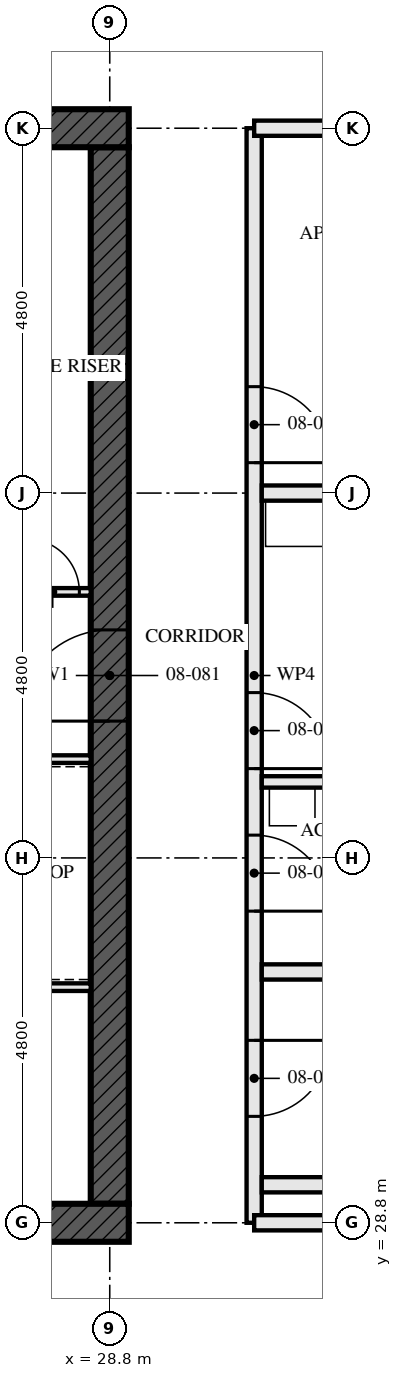
"""IFC4 building model, lengths in metres.
Left out: names, types, materials, properties, quantities, classifications, styles, units other than length and angle.
Written with IfcOpenShell. Run it as: python <this file> out.ifc"""

import sys

from ifc_helpers import new_model, si_unit, direction, frame, frame_2d, origin, place, context, subcontext, project, spatial, rectangle, extrude, element, fill, save


model = new_model("IFC4")
c1 = context("Model", 3, precision=1e-05, world=origin(), true_north=direction((0.0, 1.0)))
c2 = subcontext(c1, "Body", "Model", "MODEL_VIEW")
j1 = project(units=[si_unit("LENGTHUNIT", "METRE"), si_unit("PLANEANGLEUNIT", "RADIAN")], contexts=[c1])
p1 = place(None, origin())
s1 = spatial("IfcSite", under=j1, at=p1, CompositionType="ELEMENT")
p2 = place(p1, origin())
s2 = spatial("IfcBuilding", under=s1, at=p2, CompositionType="ELEMENT")
p3 = place(p2, frame((0.0, 0.0, 34.0)))
s3 = spatial("IfcBuildingStorey", under=s2, at=p3, CompositionType="ELEMENT", Elevation=34.0)
p4 = place(p3, frame((14.15, 28.8, -0.17), z_axis=(0.0, 0.0, 1.0), x_axis=(1.0, 0.0, 0.0)))
e1 = element("IfcWall", 1, at=p4, inside=s3, PredefinedType="SHEAR", context=c2, shape_type="SweptSolid", body=[
    extrude(rectangle(XDim=14.9, YDim=0.5, at=frame_2d((7.45, 0.0))), origin(), (0.0, 0.0, 1.0), 3.5),
])
p5 = place(p4, frame((6.85, 0.0, 0.17)))
e2 = element("IfcOpeningElement", 2, at=p5, cuts=e1, PredefinedType="OPENING", context=c2, shape_type="SweptSolid", body=[
    extrude(rectangle(XDim=1.2, YDim=2.1, at=frame_2d((0.6, 1.05))), frame((0.0, 0.26, 0.0), z_axis=(0.0, -1.0, 0.0), x_axis=(1.0, 0.0, 0.0)), (0.0, 0.0, 1.0), 0.521),
])
p6 = place(p3, frame((29.05, 43.2, -0.17), z_axis=(0.0, 0.0, 1.0), x_axis=(-1.0, 0.0, 0.0)))
e3 = element("IfcWall", 3, at=p6, inside=s3, PredefinedType="SHEAR", context=c2, shape_type="SweptSolid", body=[
    extrude(rectangle(XDim=14.9, YDim=0.5, at=frame_2d((7.45, 0.0))), origin(), (0.0, 0.0, 1.0), 3.5),
])
p7 = place(p6, frame((6.85, 0.0, 0.17)))
e4 = element("IfcOpeningElement", 4, at=p7, cuts=e3, PredefinedType="OPENING", context=c2, shape_type="SweptSolid", body=[
    extrude(rectangle(XDim=1.2, YDim=2.1, at=frame_2d((0.6, 1.05))), frame((0.0, 0.26, 0.0), z_axis=(0.0, -1.0, 0.0), x_axis=(1.0, 0.0, 0.0)), (0.0, 0.0, 1.0), 0.521),
])
p8 = place(p3, frame((28.8, 29.05, -0.17), z_axis=(0.0, 0.0, 1.0), x_axis=(0.0, 1.0, 0.0)))
e5 = element("IfcWall", 5, at=p8, inside=s3, PredefinedType="SHEAR", context=c2, shape_type="SweptSolid", body=[
    extrude(rectangle(XDim=13.9, YDim=0.5, at=frame_2d((6.95, 0.0))), origin(), (0.0, 0.0, 1.0), 3.5),
])
p9 = place(p8, frame((6.35, 0.0, 0.17)))
e6 = element("IfcOpeningElement", 6, at=p9, cuts=e5, PredefinedType="OPENING", context=c2, shape_type="SweptSolid", body=[
    extrude(rectangle(XDim=1.2, YDim=2.1, at=frame_2d((0.6, 1.05))), frame((0.0, 0.26, 0.0), z_axis=(0.0, -1.0, 0.0), x_axis=(1.0, 0.0, 0.0)), (0.0, 0.0, 1.0), 0.521),
])
for number, where, z_axis, x_axis in (
    (7, (35.5, 29.3, 0.0), (0.0, 0.0, 1.0), (-1.0, 0.0, 0.0)),
    (8, (35.5, 32.1, 0.0), (0.0, 0.0, 1.0), (-1.0, 0.0, 0.0)),
):
    element("IfcWall", number, at=place(p3, frame(where, z_axis=z_axis, x_axis=x_axis)), inside=s3, PredefinedType="SOLIDWALL", context=c2, shape_type="SweptSolid", body=[
        extrude(rectangle(XDim=4.7, YDim=0.2, at=frame_2d((2.35, 0.0))), origin(), (0.0, 0.0, 1.0), 2.99),
    ])
p10 = place(p3, frame((33.8, 34.6, 0.0), z_axis=(0.0, 0.0, 1.0), x_axis=(-1.0, 0.0, 0.0)))
e9 = element("IfcWall", 9, at=p10, inside=s3, PredefinedType="PARTITIONING", context=c2, shape_type="SweptSolid", body=[
    extrude(rectangle(XDim=3.0, YDim=0.15, at=frame_2d((1.5, 0.0))), origin(), (0.0, 0.0, 1.0), 3.33),
])
p11 = place(p3, frame((42.805, 38.4, 0.0), z_axis=(0.0, 0.0, 1.0), x_axis=(-1.0, 0.0, 0.0)))
e10 = element("IfcWall", 10, at=p11, inside=s3, PredefinedType="PARTITIONING", context=c2, shape_type="SweptSolid", body=[
    extrude(rectangle(XDim=12.005, YDim=0.2, at=frame_2d((6.002, 0.0))), origin(), (0.0, 0.0, 1.0), 2.55),
])
p12 = place(p3, frame((30.7, 28.8, 0.0), z_axis=(0.0, 0.0, 1.0), x_axis=(0.0, 1.0, 0.0)))
e11 = element("IfcWall", 11, at=p12, inside=s3, PredefinedType="PARTITIONING", context=c2, shape_type="SweptSolid", body=[
    extrude(rectangle(XDim=14.4, YDim=0.2, at=frame_2d((7.2, 0.0))), origin(), (0.0, 0.0, 1.0), 2.55),
])
p13 = place(p12, frame((1.4, 0.0, 0.0)))
e12 = element("IfcOpeningElement", 12, at=p13, cuts=e11, PredefinedType="OPENING", context=c2, shape_type="SweptSolid", body=[
    extrude(rectangle(XDim=1.0, YDim=2.1, at=frame_2d((0.5, 1.05))), frame((0.0, 0.111, 0.0), z_axis=(0.0, -1.0, 0.0), x_axis=(1.0, 0.0, 0.0)), (0.0, 0.0, 1.0), 0.221),
])
p14 = place(p12, frame((4.1, 0.0, 0.0)))
e13 = element("IfcOpeningElement", 13, at=p14, cuts=e11, PredefinedType="OPENING", context=c2, shape_type="SweptSolid", body=[
    extrude(rectangle(XDim=1.0, YDim=2.1, at=frame_2d((0.5, 1.05))), frame((0.0, 0.111, 0.0), z_axis=(0.0, -1.0, 0.0), x_axis=(1.0, 0.0, 0.0)), (0.0, 0.0, 1.0), 0.221),
])
p15 = place(p12, frame((5.975, 0.0, 0.0)))
e14 = element("IfcOpeningElement", 14, at=p15, cuts=e11, PredefinedType="OPENING", context=c2, shape_type="SweptSolid", body=[
    extrude(rectangle(XDim=1.0, YDim=2.1, at=frame_2d((0.5, 1.05))), frame((0.0, 0.111, 0.0), z_axis=(0.0, -1.0, 0.0), x_axis=(1.0, 0.0, 0.0)), (0.0, 0.0, 1.0), 0.221),
])
p16 = place(p12, frame((10.0, 0.0, 0.0)))
e15 = element("IfcOpeningElement", 15, at=p16, cuts=e11, PredefinedType="OPENING", context=c2, shape_type="SweptSolid", body=[
    extrude(rectangle(XDim=1.0, YDim=2.1, at=frame_2d((0.5, 1.05))), frame((0.0, 0.111, 0.0), z_axis=(0.0, -1.0, 0.0), x_axis=(1.0, 0.0, 0.0)), (0.0, 0.0, 1.0), 0.221),
])
p17 = place(p3, frame((23.05, 34.9, 0.0), z_axis=(0.0, 0.0, 1.0), x_axis=(1.0, 0.0, 0.0)))
e16 = element("IfcWall", 16, at=p17, inside=s3, PredefinedType="SOLIDWALL", context=c2, shape_type="SweptSolid", body=[
    extrude(rectangle(XDim=5.5, YDim=0.1, at=frame_2d((2.75, 0.0))), origin(), (0.0, 0.0, 1.0), 3.33),
])
p18 = place(p3, frame((22.65, 37.1, 0.0), z_axis=(0.0, 0.0, 1.0), x_axis=(1.0, 0.0, 0.0)))
e17 = element("IfcWall", 17, at=p18, inside=s3, PredefinedType="SOLIDWALL", context=c2, shape_type="SweptSolid", body=[
    extrude(rectangle(XDim=5.9, YDim=0.1, at=frame_2d((2.95, 0.0))), origin(), (0.0, 0.0, 1.0), 3.33),
])
p19 = place(p18, frame((3.5, 0.0, 0.0)))
e18 = element("IfcOpeningElement", 18, at=p19, cuts=e17, PredefinedType="OPENING", context=c2, shape_type="SweptSolid", body=[
    extrude(rectangle(XDim=0.9, YDim=2.1, at=frame_2d((0.45, 1.05))), frame((0.0, 0.061, 0.0), z_axis=(0.0, -1.0, 0.0), x_axis=(1.0, 0.0, 0.0)), (0.0, 0.0, 1.0), 0.121),
])
p20 = place(p18, frame((5.05, 0.0, 0.0)))
e19 = element("IfcOpeningElement", 19, at=p20, cuts=e17, PredefinedType="OPENING", context=c2, shape_type="SweptSolid", body=[
    extrude(rectangle(XDim=0.7, YDim=2.1, at=frame_2d((0.35, 1.05))), frame((0.0, 0.061, 0.0), z_axis=(0.0, -1.0, 0.0), x_axis=(1.0, 0.0, 0.0)), (0.0, 0.0, 1.0), 0.121),
])
p21 = place(p3, frame((23.15, 31.9, 0.0), z_axis=(0.0, 0.0, 1.0), x_axis=(1.0, 0.0, 0.0)))
e20 = element("IfcWall", 20, at=p21, inside=s3, PredefinedType="SOLIDWALL", context=c2, shape_type="SweptSolid", body=[
    extrude(rectangle(XDim=5.4, YDim=0.1, at=frame_2d((2.7, 0.0))), origin(), (0.0, 0.0, 1.0), 3.33),
])
for number, where, z_axis, x_axis in (
    (21, (33.205, 28.8, 0.0), (0.0, 0.0, 1.0), (-1.0, 0.0, 0.0)),
    (22, (33.205, 43.2, 0.0), (0.0, 0.0, 1.0), (-1.0, 0.0, 0.0)),
):
    element("IfcWall", number, at=place(p3, frame(where, z_axis=z_axis, x_axis=x_axis)), inside=s3, PredefinedType="PARTITIONING", context=c2, shape_type="SweptSolid", body=[
        extrude(rectangle(XDim=2.505, YDim=0.2, at=frame_2d((1.252, 0.0))), origin(), (0.0, 0.0, 1.0), 2.32),
    ])
p22 = place(p13, frame((1.0, 0.0, 0.0), z_axis=(0.0, 0.0, 1.0), x_axis=(-1.0, 0.0, 0.0)))
e23 = element("IfcDoor", 23, at=p22, inside=s3, OperationType="SINGLE_SWING_RIGHT", PredefinedType="DOOR", context=c2, shape_type="SweptSolid", body=[
    extrude(rectangle(XDim=1.0, YDim=2.1, at=frame_2d((0.5, 1.05))), frame((0.0, 0.032, 0.0), z_axis=(0.0, -1.0, 0.0), x_axis=(1.0, 0.0, 0.0)), (0.0, 0.0, 1.0), 0.064),
])
fill(e12, e23)
p23 = place(p14, frame((1.0, 0.0, 0.0), z_axis=(0.0, 0.0, 1.0), x_axis=(-1.0, 0.0, 0.0)))
e24 = element("IfcDoor", 24, at=p23, inside=s3, OperationType="SINGLE_SWING_LEFT", PredefinedType="DOOR", context=c2, shape_type="SweptSolid", body=[
    extrude(rectangle(XDim=1.0, YDim=2.1, at=frame_2d((0.5, 1.05))), frame((0.0, 0.027, 0.0), z_axis=(0.0, -1.0, 0.0), x_axis=(1.0, 0.0, 0.0)), (0.0, 0.0, 1.0), 0.054),
])
fill(e13, e24)
p24 = place(p15, frame((1.0, 0.0, 0.0), z_axis=(0.0, 0.0, 1.0), x_axis=(-1.0, 0.0, 0.0)))
e25 = element("IfcDoor", 25, at=p24, inside=s3, OperationType="SINGLE_SWING_LEFT", PredefinedType="DOOR", context=c2, shape_type="SweptSolid", body=[
    extrude(rectangle(XDim=1.0, YDim=2.1, at=frame_2d((0.5, 1.05))), frame((0.0, 0.027, 0.0), z_axis=(0.0, -1.0, 0.0), x_axis=(1.0, 0.0, 0.0)), (0.0, 0.0, 1.0), 0.054),
])
fill(e14, e25)
p25 = place(p16, frame((1.0, 0.0, 0.0), z_axis=(0.0, 0.0, 1.0), x_axis=(-1.0, 0.0, 0.0)))
e26 = element("IfcDoor", 26, at=p25, inside=s3, OperationType="SINGLE_SWING_LEFT", PredefinedType="DOOR", context=c2, shape_type="SweptSolid", body=[
    extrude(rectangle(XDim=1.0, YDim=2.1, at=frame_2d((0.5, 1.05))), frame((0.0, 0.027, 0.0), z_axis=(0.0, -1.0, 0.0), x_axis=(1.0, 0.0, 0.0)), (0.0, 0.0, 1.0), 0.054),
])
fill(e15, e26)
p26 = place(p20, origin())
e27 = element("IfcDoor", 27, at=p26, inside=s3, OperationType="SINGLE_SWING_RIGHT", PredefinedType="DOOR", context=c2, shape_type="SweptSolid", body=[
    extrude(rectangle(XDim=0.7, YDim=2.1, at=frame_2d((0.35, 1.05))), frame((0.0, 0.027, 0.0), z_axis=(0.0, -1.0, 0.0), x_axis=(1.0, 0.0, 0.0)), (0.0, 0.0, 1.0), 0.054),
])
fill(e19, e27)
p27 = place(p9, origin())
e28 = element("IfcDoor", 28, at=p27, inside=s3, OperationType="SINGLE_SWING_LEFT", PredefinedType="DOOR", context=c2, shape_type="SweptSolid", body=[
    extrude(rectangle(XDim=1.2, YDim=2.1, at=frame_2d((0.6, 1.05))), frame((0.0, 0.027, 0.0), z_axis=(0.0, -1.0, 0.0), x_axis=(1.0, 0.0, 0.0)), (0.0, 0.0, 1.0), 0.054),
])
fill(e6, e28)
save(model, sys.argv[1])
